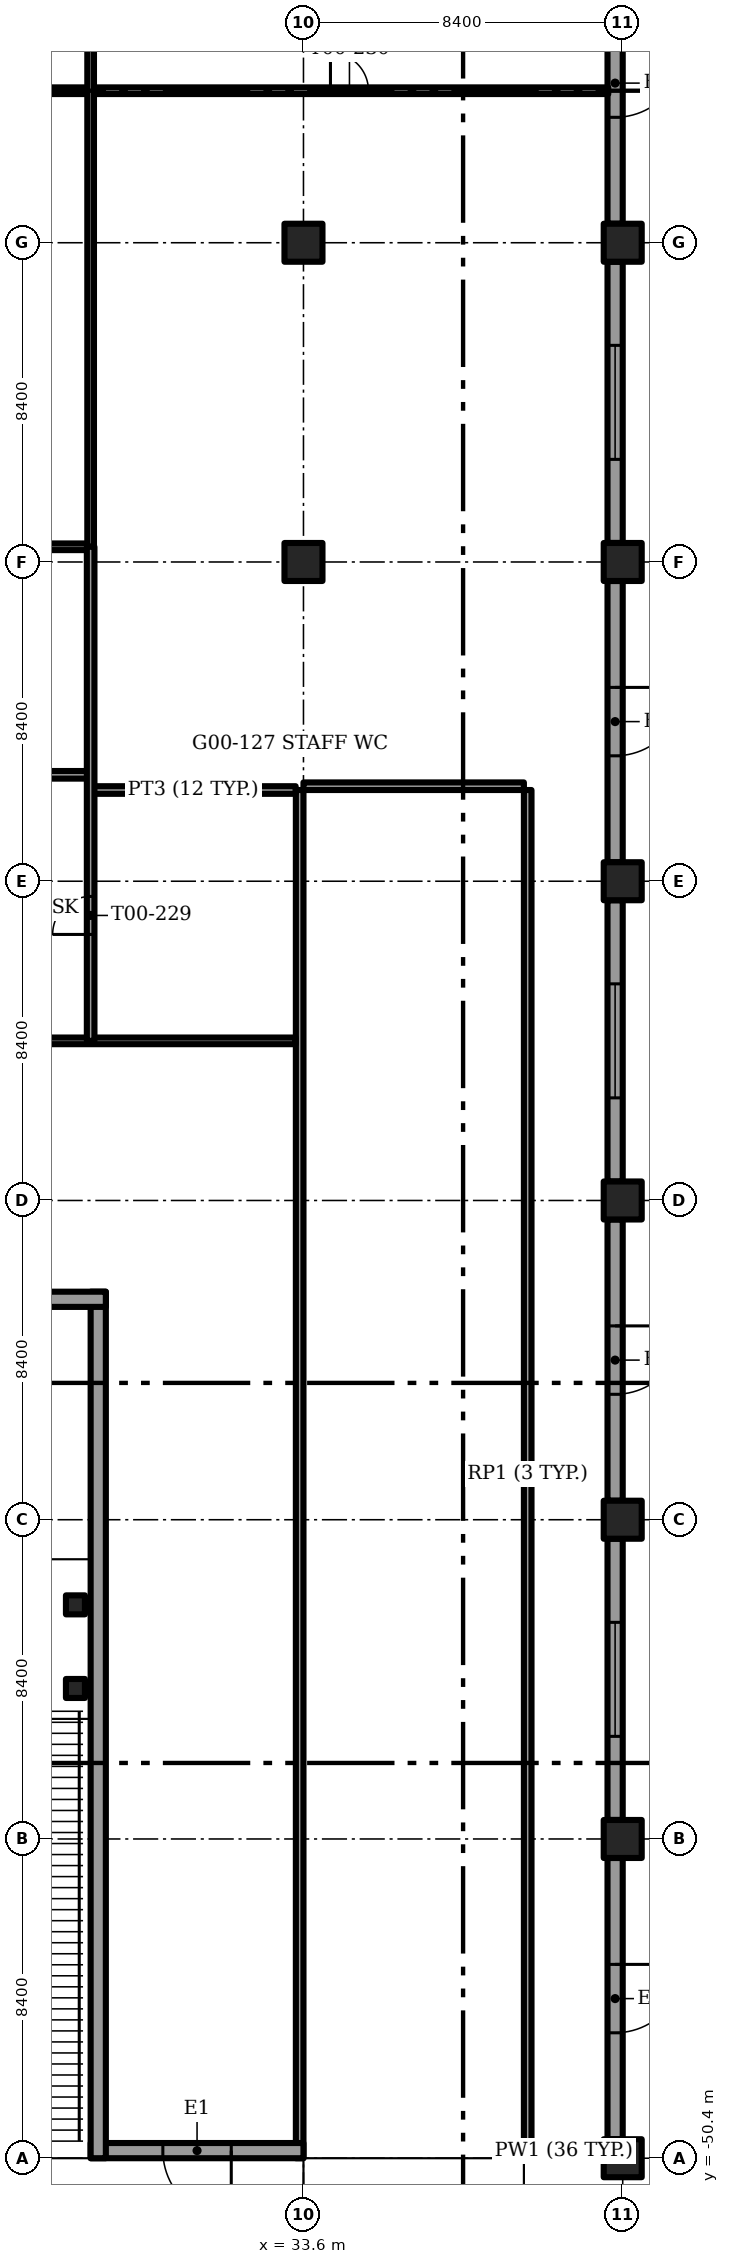
"""IFC4 building model, lengths in metres.
Left out: names, types, materials, properties, quantities, classifications, styles, units other than length and angle.
Written with IfcOpenShell. Run it as: python <this file> out.ifc"""

import sys

from ifc_helpers import new_model, si_unit, direction, frame, frame_2d, origin, origin_2d, place, context, subcontext, project, spatial, rectangle, extrude, element, fill, save


model = new_model("IFC4")
c1 = context("Model", 3, precision=1e-05, world=origin(), true_north=direction((0.0, 1.0)))
c2 = subcontext(c1, "Body", "Model", "MODEL_VIEW")
j1 = project(units=[si_unit("LENGTHUNIT", "METRE"), si_unit("PLANEANGLEUNIT", "RADIAN")], contexts=[c1])
p1 = place(None, origin())
s1 = spatial("IfcSite", under=j1, at=p1, CompositionType="ELEMENT")
p2 = place(p1, origin())
s2 = spatial("IfcBuilding", under=s1, at=p2, CompositionType="ELEMENT")
p3 = place(p2, origin())
s3 = spatial("IfcBuildingStorey", under=s2, at=p3, CompositionType="ELEMENT", Elevation=0.0)
for number, where, z_axis, x_axis in (
    (1, (33.6, -8.4, -0.35), (0.0, 0.0, 1.0), (1.0, 0.0, 0.0)),
    (2, (33.6, 0.0, -0.35), (0.0, 0.0, 1.0), (1.0, 0.0, 0.0)),
    (3, (42.0, -50.4, -0.35), (0.0, 0.0, 1.0), (1.0, 0.0, 0.0)),
    (4, (42.0, -42.0, -0.35), (0.0, 0.0, 1.0), (1.0, 0.0, 0.0)),
    (5, (42.0, -33.6, -0.35), (0.0, 0.0, 1.0), (1.0, 0.0, 0.0)),
    (6, (42.0, -25.2, -0.35), (0.0, 0.0, 1.0), (1.0, 0.0, 0.0)),
    (7, (42.0, -16.8, -0.35), (0.0, 0.0, 1.0), (1.0, 0.0, 0.0)),
    (8, (42.0, -8.4, -0.35), (0.0, 0.0, 1.0), (1.0, 0.0, 0.0)),
    (9, (42.0, 0.0, -0.35), (0.0, 0.0, 1.0), (1.0, 0.0, 0.0)),
):
    element("IfcColumn", number, at=place(p3, frame(where, z_axis=z_axis, x_axis=x_axis)), inside=s3, PredefinedType="COLUMN", context=c2, shape_type="SweptSolid", body=[
        extrude(rectangle(XDim=1.0, YDim=1.0, at=origin_2d()), origin(), (0.0, 0.0, 1.0), 6.0),
    ])
p4 = place(p3, frame((41.5, -50.2, 0.0), z_axis=(0.0, 0.0, 1.0), x_axis=(-1.0, 0.0, 0.0)))
e10 = element("IfcWall", 10, at=p4, inside=s3, PredefinedType="SOLIDWALL", context=c2, shape_type="SweptSolid", body=[
    extrude(rectangle(XDim=2.1, YDim=0.4, at=frame_2d((1.05, 0.0))), origin(), (0.0, 0.0, 1.0), 5.65),
])
p5 = place(p3, frame((33.6, -50.2, 0.0), z_axis=(0.0, 0.0, 1.0), x_axis=(-1.0, 0.0, 0.0)))
e11 = element("IfcWall", 11, at=p5, inside=s3, PredefinedType="SOLIDWALL", context=c2, shape_type="SweptSolid", body=[
    extrude(rectangle(XDim=5.6, YDim=0.4, at=frame_2d((2.8, 0.0))), origin(), (0.0, 0.0, 1.0), 5.65),
])
p6 = place(p5, frame((1.9, 0.0, 0.0)))
e12 = element("IfcOpeningElement", 12, at=p6, cuts=e11, PredefinedType="OPENING", context=c2, shape_type="SweptSolid", body=[
    extrude(rectangle(XDim=1.8, YDim=2.4, at=frame_2d((0.9, 1.2))), frame((0.0, 0.2, 0.0), z_axis=(0.0, -1.0, 0.0), x_axis=(1.0, 0.0, 0.0)), (0.0, 0.0, 1.0), 0.4),
])
p7 = place(p3, frame((41.8, 7.9, 0.0), z_axis=(0.0, 0.0, 1.0), x_axis=(0.0, -1.0, 0.0)))
e13 = element("IfcWall", 13, at=p7, inside=s3, PredefinedType="SOLIDWALL", context=c2, shape_type="SweptSolid", body=[
    extrude(rectangle(XDim=7.4, YDim=0.4, at=frame_2d((3.7, 0.0))), origin(), (0.0, 0.0, 1.0), 5.65),
])
p8 = place(p7, frame((2.8, 0.0, 0.0)))
e14 = element("IfcOpeningElement", 14, at=p8, cuts=e13, PredefinedType="OPENING", context=c2, shape_type="SweptSolid", body=[
    extrude(rectangle(XDim=1.8, YDim=2.4, at=frame_2d((0.9, 1.2))), frame((0.0, 0.2, 0.0), z_axis=(0.0, -1.0, 0.0), x_axis=(1.0, 0.0, 0.0)), (0.0, 0.0, 1.0), 0.4),
])
p9 = place(p3, frame((41.8, -0.5, 0.0), z_axis=(0.0, 0.0, 1.0), x_axis=(0.0, -1.0, 0.0)))
e15 = element("IfcWall", 15, at=p9, inside=s3, PredefinedType="SOLIDWALL", context=c2, shape_type="SweptSolid", body=[
    extrude(rectangle(XDim=7.4, YDim=0.4, at=frame_2d((3.7, 0.0))), origin(), (0.0, 0.0, 1.0), 5.65),
])
p10 = place(p9, frame((2.2, 0.0, 1.0)))
e16 = element("IfcOpeningElement", 16, at=p10, cuts=e15, PredefinedType="OPENING", context=c2, shape_type="SweptSolid", body=[
    extrude(rectangle(XDim=3.0, YDim=2.2, at=frame_2d((1.5, 1.1))), frame((0.0, 0.2, 0.0), z_axis=(0.0, -1.0, 0.0), x_axis=(1.0, 0.0, 0.0)), (0.0, 0.0, 1.0), 0.4),
])
p11 = place(p3, frame((41.8, -8.9, 0.0), z_axis=(0.0, 0.0, 1.0), x_axis=(0.0, -1.0, 0.0)))
e17 = element("IfcWall", 17, at=p11, inside=s3, PredefinedType="SOLIDWALL", context=c2, shape_type="SweptSolid", body=[
    extrude(rectangle(XDim=7.4, YDim=0.4, at=frame_2d((3.7, 0.0))), origin(), (0.0, 0.0, 1.0), 5.65),
])
p12 = place(p11, frame((2.8, 0.0, 0.0)))
e18 = element("IfcOpeningElement", 18, at=p12, cuts=e17, PredefinedType="OPENING", context=c2, shape_type="SweptSolid", body=[
    extrude(rectangle(XDim=1.8, YDim=2.4, at=frame_2d((0.9, 1.2))), frame((0.0, 0.2, 0.0), z_axis=(0.0, -1.0, 0.0), x_axis=(1.0, 0.0, 0.0)), (0.0, 0.0, 1.0), 0.4),
])
p13 = place(p3, frame((41.8, -17.3, 0.0), z_axis=(0.0, 0.0, 1.0), x_axis=(0.0, -1.0, 0.0)))
e19 = element("IfcWall", 19, at=p13, inside=s3, PredefinedType="SOLIDWALL", context=c2, shape_type="SweptSolid", body=[
    extrude(rectangle(XDim=7.4, YDim=0.4, at=frame_2d((3.7, 0.0))), origin(), (0.0, 0.0, 1.0), 5.65),
])
p14 = place(p13, frame((2.2, 0.0, 1.0)))
e20 = element("IfcOpeningElement", 20, at=p14, cuts=e19, PredefinedType="OPENING", context=c2, shape_type="SweptSolid", body=[
    extrude(rectangle(XDim=3.0, YDim=2.2, at=frame_2d((1.5, 1.1))), frame((0.0, 0.2, 0.0), z_axis=(0.0, -1.0, 0.0), x_axis=(1.0, 0.0, 0.0)), (0.0, 0.0, 1.0), 0.4),
])
p15 = place(p3, frame((41.8, -25.7, 0.0), z_axis=(0.0, 0.0, 1.0), x_axis=(0.0, -1.0, 0.0)))
e21 = element("IfcWall", 21, at=p15, inside=s3, PredefinedType="SOLIDWALL", context=c2, shape_type="SweptSolid", body=[
    extrude(rectangle(XDim=7.4, YDim=0.4, at=frame_2d((3.7, 0.0))), origin(), (0.0, 0.0, 1.0), 5.65),
])
p16 = place(p15, frame((2.8, 0.0, 0.0)))
e22 = element("IfcOpeningElement", 22, at=p16, cuts=e21, PredefinedType="OPENING", context=c2, shape_type="SweptSolid", body=[
    extrude(rectangle(XDim=1.8, YDim=2.4, at=frame_2d((0.9, 1.2))), frame((0.0, 0.2, 0.0), z_axis=(0.0, -1.0, 0.0), x_axis=(1.0, 0.0, 0.0)), (0.0, 0.0, 1.0), 0.4),
])
p17 = place(p3, frame((41.8, -34.1, 0.0), z_axis=(0.0, 0.0, 1.0), x_axis=(0.0, -1.0, 0.0)))
e23 = element("IfcWall", 23, at=p17, inside=s3, PredefinedType="SOLIDWALL", context=c2, shape_type="SweptSolid", body=[
    extrude(rectangle(XDim=7.4, YDim=0.4, at=frame_2d((3.7, 0.0))), origin(), (0.0, 0.0, 1.0), 5.65),
])
p18 = place(p17, frame((2.2, 0.0, 1.0)))
e24 = element("IfcOpeningElement", 24, at=p18, cuts=e23, PredefinedType="OPENING", context=c2, shape_type="SweptSolid", body=[
    extrude(rectangle(XDim=3.0, YDim=2.2, at=frame_2d((1.5, 1.1))), frame((0.0, 0.2, 0.0), z_axis=(0.0, -1.0, 0.0), x_axis=(1.0, 0.0, 0.0)), (0.0, 0.0, 1.0), 0.4),
])
p19 = place(p3, frame((41.8, -42.5, 0.0), z_axis=(0.0, 0.0, 1.0), x_axis=(0.0, -1.0, 0.0)))
e25 = element("IfcWall", 25, at=p19, inside=s3, PredefinedType="SOLIDWALL", context=c2, shape_type="SweptSolid", body=[
    extrude(rectangle(XDim=7.4, YDim=0.4, at=frame_2d((3.7, 0.0))), origin(), (0.0, 0.0, 1.0), 5.65),
])
p20 = place(p19, frame((2.8, 0.0, 0.0)))
e26 = element("IfcOpeningElement", 26, at=p20, cuts=e25, PredefinedType="OPENING", context=c2, shape_type="SweptSolid", body=[
    extrude(rectangle(XDim=1.8, YDim=2.4, at=frame_2d((0.9, 1.2))), frame((0.0, 0.2, 0.0), z_axis=(0.0, -1.0, 0.0), x_axis=(1.0, 0.0, 0.0)), (0.0, 0.0, 1.0), 0.4),
])
p21 = place(p3, frame((28.2, -50.4, 0.0), z_axis=(0.0, 0.0, 1.0), x_axis=(0.0, 1.0, 0.0)))
e27 = element("IfcWall", 27, at=p21, inside=s3, PredefinedType="SOLIDWALL", context=c2, shape_type="SweptSolid", body=[
    extrude(rectangle(XDim=22.8, YDim=0.4, at=frame_2d((11.4, 0.0))), origin(), (0.0, 0.0, 1.0), 5.65),
])
p22 = place(p3, frame((13.6, -27.8, 0.0), z_axis=(0.0, 0.0, 1.0), x_axis=(1.0, 0.0, 0.0)))
e28 = element("IfcWall", 28, at=p22, inside=s3, PredefinedType="SOLIDWALL", context=c2, shape_type="SweptSolid", body=[
    extrude(rectangle(XDim=14.8, YDim=0.4, at=frame_2d((7.4, 0.0))), origin(), (0.0, 0.0, 1.0), 5.65),
])
p23 = place(p3, frame((39.5, -50.4, 0.0), z_axis=(0.0, 0.0, 1.0), x_axis=(0.0, 1.0, 0.0)))
e29 = element("IfcWall", 29, at=p23, inside=s3, PredefinedType="PARAPET", context=c2, shape_type="SweptSolid", body=[
    extrude(rectangle(XDim=36.0, YDim=0.2, at=frame_2d((18.0, 0.0))), origin(), (0.0, 0.0, 1.0), 1.1),
])
p24 = place(p3, frame((39.4, -14.3, 0.0), z_axis=(0.0, 0.0, 1.0), x_axis=(-1.0, 0.0, 0.0)))
e30 = element("IfcWall", 30, at=p24, inside=s3, PredefinedType="PARAPET", context=c2, shape_type="SweptSolid", body=[
    extrude(rectangle(XDim=5.8, YDim=0.2, at=frame_2d((2.9, 0.0))), origin(), (0.0, 0.0, 1.0), 1.1),
])
p25 = place(p3, frame((33.5, -14.4, 0.0), z_axis=(0.0, 0.0, 1.0), x_axis=(0.0, -1.0, 0.0)))
e31 = element("IfcWall", 31, at=p25, inside=s3, PredefinedType="PARAPET", context=c2, shape_type="SweptSolid", body=[
    extrude(rectangle(XDim=36.0, YDim=0.2, at=frame_2d((18.0, 0.0))), origin(), (0.0, 0.0, 1.0), 1.1),
])
for number, where, z_axis, x_axis in (
    (32, (27.6, -38.04, 0.0), (0.0, 0.0, 1.0), (1.0, 0.0, 0.0)),
    (33, (27.6, -35.84, 0.0), (0.0, 0.0, 1.0), (1.0, 0.0, 0.0)),
):
    element("IfcColumn", number, at=place(p3, frame(where, z_axis=z_axis, x_axis=x_axis)), inside=s3, PredefinedType="COLUMN", context=c2, shape_type="SweptSolid", body=[
        extrude(rectangle(XDim=0.5, YDim=0.5, at=origin_2d()), origin(), (0.0, 0.0, 1.0), 5.65),
    ])
p26 = place(p3, frame((17.0, -21.0, 0.0), z_axis=(0.0, 0.0, 1.0), x_axis=(1.0, 0.0, 0.0)))
e34 = element("IfcWall", 34, at=p26, inside=s3, PredefinedType="PARTITIONING", context=c2, shape_type="SweptSolid", body=[
    extrude(rectangle(XDim=16.395, YDim=0.175, at=frame_2d((8.198, 0.0))), origin(), (0.0, 0.0, 1.0), 5.65),
])
p27 = place(p26, frame((5.0, 0.0, 0.0)))
e35 = element("IfcOpeningElement", 35, at=p27, cuts=e34, PredefinedType="OPENING", context=c2, shape_type="SweptSolid", body=[
    extrude(rectangle(XDim=1.0, YDim=2.1, at=frame_2d((0.5, 1.05))), frame((0.0, 0.087, 0.0), z_axis=(0.0, -1.0, 0.0), x_axis=(1.0, 0.0, 0.0)), (0.0, 0.0, 1.0), 0.175),
])
p28 = place(p3, frame((21.0, -8.0, 0.0), z_axis=(0.0, 0.0, 1.0), x_axis=(1.0, 0.0, 0.0)))
e36 = element("IfcWall", 36, at=p28, inside=s3, PredefinedType="PARTITIONING", context=c2, shape_type="SweptSolid", body=[
    extrude(rectangle(XDim=7.0, YDim=0.175, at=frame_2d((3.5, 0.0))), origin(), (0.0, 0.0, 1.0), 5.65),
])
p29 = place(p28, frame((3.499, 0.0, 0.0)))
e37 = element("IfcOpeningElement", 37, at=p29, cuts=e36, PredefinedType="OPENING", context=c2, shape_type="SweptSolid", body=[
    extrude(rectangle(XDim=1.0, YDim=2.1, at=frame_2d((0.5, 1.05))), frame((0.0, 0.087, 0.0), z_axis=(0.0, -1.0, 0.0), x_axis=(1.0, 0.0, 0.0)), (0.0, 0.0, 1.0), 0.175),
])
p30 = place(p3, frame((17.0, 4.0, 0.0), z_axis=(0.0, 0.0, 1.0), x_axis=(1.0, 0.0, 0.0)))
e38 = element("IfcWall", 38, at=p30, inside=s3, PredefinedType="PARTITIONING", context=c2, shape_type="SweptSolid", body=[
    extrude(rectangle(XDim=24.62, YDim=0.175, at=frame_2d((12.31, 0.0))), origin(), (0.0, 0.0, 1.0), 4.8),
])
p31 = place(p30, frame((5.0, 0.0, 0.0)))
e39 = element("IfcOpeningElement", 39, at=p31, cuts=e38, PredefinedType="OPENING", context=c2, shape_type="SweptSolid", body=[
    extrude(rectangle(XDim=1.0, YDim=2.1, at=frame_2d((0.5, 1.05))), frame((0.0, 0.087, 0.0), z_axis=(0.0, -1.0, 0.0), x_axis=(1.0, 0.0, 0.0)), (0.0, 0.0, 1.0), 0.175),
])
p32 = place(p30, frame((17.31, 0.0, 0.0)))
e40 = element("IfcOpeningElement", 40, at=p32, cuts=e38, PredefinedType="OPENING", context=c2, shape_type="SweptSolid", body=[
    extrude(rectangle(XDim=1.0, YDim=2.1, at=frame_2d((0.5, 1.05))), frame((0.0, 0.087, 0.0), z_axis=(0.0, -1.0, 0.0), x_axis=(1.0, 0.0, 0.0)), (0.0, 0.0, 1.0), 0.175),
])
p33 = place(p3, frame((28.0, -8.0, 0.0), z_axis=(0.0, 0.0, 1.0), x_axis=(0.0, 1.0, 0.0)))
e41 = element("IfcWall", 41, at=p33, inside=s3, PredefinedType="PARTITIONING", context=c2, shape_type="SweptSolid", body=[
    extrude(rectangle(XDim=24.8, YDim=0.175, at=frame_2d((12.4, 0.0))), origin(), (0.0, 0.0, 1.0), 5.65),
])
p34 = place(p33, frame((21.95, 0.0, 0.0)))
e42 = element("IfcOpeningElement", 42, at=p34, cuts=e41, PredefinedType="OPENING", context=c2, shape_type="SweptSolid", body=[
    extrude(rectangle(XDim=0.9, YDim=2.1, at=frame_2d((0.45, 1.05))), frame((0.0, 0.087, 0.0), z_axis=(0.0, -1.0, 0.0), x_axis=(1.0, 0.0, 0.0)), (0.0, 0.0, 1.0), 0.175),
])
p35 = place(p33, frame((18.5, 0.0, 0.0)))
e43 = element("IfcOpeningElement", 43, at=p35, cuts=e41, PredefinedType="OPENING", context=c2, shape_type="SweptSolid", body=[
    extrude(rectangle(XDim=1.0, YDim=2.1, at=frame_2d((0.5, 1.05))), frame((0.0, 0.087, 0.0), z_axis=(0.0, -1.0, 0.0), x_axis=(1.0, 0.0, 0.0)), (0.0, 0.0, 1.0), 0.175),
])
p36 = place(p3, frame((28.0, -14.4, 0.0), z_axis=(0.0, 0.0, 1.0), x_axis=(1.0, 0.0, 0.0)))
e44 = element("IfcWall", 44, at=p36, inside=s3, PredefinedType="PARTITIONING", context=c2, shape_type="SweptSolid", body=[
    extrude(rectangle(XDim=5.395, YDim=0.2, at=frame_2d((2.698, 0.0))), origin(), (0.0, 0.0, 1.0), 5.65),
])
p37 = place(p3, frame((21.0, -14.0, 0.0), z_axis=(0.0, 0.0, 1.0), x_axis=(1.0, 0.0, 0.0)))
e45 = element("IfcWall", 45, at=p37, inside=s3, PredefinedType="PARTITIONING", context=c2, shape_type="SweptSolid", body=[
    extrude(rectangle(XDim=7.0, YDim=0.2, at=frame_2d((3.5, 0.0))), origin(), (0.0, 0.0, 1.0), 5.65),
])
p38 = place(p3, frame((28.0, -21.0, 0.0), z_axis=(0.0, 0.0, 1.0), x_axis=(0.0, 1.0, 0.0)))
e46 = element("IfcWall", 46, at=p38, inside=s3, PredefinedType="PARTITIONING", context=c2, shape_type="SweptSolid", body=[
    extrude(rectangle(XDim=13.0, YDim=0.2, at=frame_2d((6.5, 0.0))), origin(), (0.0, 0.0, 1.0), 5.65),
])
p39 = place(p38, frame((2.8, 0.0, 0.0)))
e47 = element("IfcOpeningElement", 47, at=p39, cuts=e46, PredefinedType="OPENING", context=c2, shape_type="SweptSolid", body=[
    extrude(rectangle(XDim=1.0, YDim=2.1, at=frame_2d((0.5, 1.05))), frame((0.0, 0.1, 0.0), z_axis=(0.0, -1.0, 0.0), x_axis=(1.0, 0.0, 0.0)), (0.0, 0.0, 1.0), 0.2),
])
p40 = place(p6, origin())
e48 = element("IfcDoor", 48, at=p40, inside=s3, OperationType="SINGLE_SWING_LEFT", PredefinedType="DOOR", context=c2, shape_type="SweptSolid", body=[
    extrude(rectangle(XDim=1.8, YDim=2.4, at=frame_2d((0.9, 1.2))), frame((0.0, 0.025, 0.0), z_axis=(0.0, -1.0, 0.0), x_axis=(1.0, 0.0, 0.0)), (0.0, 0.0, 1.0), 0.05),
])
fill(e12, e48)
p41 = place(p8, origin())
e49 = element("IfcDoor", 49, at=p41, inside=s3, OperationType="SINGLE_SWING_LEFT", PredefinedType="DOOR", context=c2, shape_type="SweptSolid", body=[
    extrude(rectangle(XDim=1.8, YDim=2.4, at=frame_2d((0.9, 1.2))), frame((0.0, 0.025, 0.0), z_axis=(0.0, -1.0, 0.0), x_axis=(1.0, 0.0, 0.0)), (0.0, 0.0, 1.0), 0.05),
])
fill(e14, e49)
p42 = place(p10, origin())
e50 = element("IfcWindow", 50, at=p42, inside=s3, PartitioningType="SINGLE_PANEL", PredefinedType="WINDOW", context=c2, shape_type="SweptSolid", body=[
    extrude(rectangle(XDim=3.0, YDim=2.2, at=frame_2d((1.5, 1.1))), frame((0.0, 0.03, 0.0), z_axis=(0.0, -1.0, 0.0), x_axis=(1.0, 0.0, 0.0)), (0.0, 0.0, 1.0), 0.06),
])
fill(e16, e50)
p43 = place(p12, origin())
e51 = element("IfcDoor", 51, at=p43, inside=s3, OperationType="SINGLE_SWING_LEFT", PredefinedType="DOOR", context=c2, shape_type="SweptSolid", body=[
    extrude(rectangle(XDim=1.8, YDim=2.4, at=frame_2d((0.9, 1.2))), frame((0.0, 0.025, 0.0), z_axis=(0.0, -1.0, 0.0), x_axis=(1.0, 0.0, 0.0)), (0.0, 0.0, 1.0), 0.05),
])
fill(e18, e51)
p44 = place(p14, origin())
e52 = element("IfcWindow", 52, at=p44, inside=s3, PartitioningType="SINGLE_PANEL", PredefinedType="WINDOW", context=c2, shape_type="SweptSolid", body=[
    extrude(rectangle(XDim=3.0, YDim=2.2, at=frame_2d((1.5, 1.1))), frame((0.0, 0.03, 0.0), z_axis=(0.0, -1.0, 0.0), x_axis=(1.0, 0.0, 0.0)), (0.0, 0.0, 1.0), 0.06),
])
fill(e20, e52)
p45 = place(p16, origin())
e53 = element("IfcDoor", 53, at=p45, inside=s3, OperationType="SINGLE_SWING_LEFT", PredefinedType="DOOR", context=c2, shape_type="SweptSolid", body=[
    extrude(rectangle(XDim=1.8, YDim=2.4, at=frame_2d((0.9, 1.2))), frame((0.0, 0.025, 0.0), z_axis=(0.0, -1.0, 0.0), x_axis=(1.0, 0.0, 0.0)), (0.0, 0.0, 1.0), 0.05),
])
fill(e22, e53)
p46 = place(p18, origin())
e54 = element("IfcWindow", 54, at=p46, inside=s3, PartitioningType="SINGLE_PANEL", PredefinedType="WINDOW", context=c2, shape_type="SweptSolid", body=[
    extrude(rectangle(XDim=3.0, YDim=2.2, at=frame_2d((1.5, 1.1))), frame((0.0, 0.03, 0.0), z_axis=(0.0, -1.0, 0.0), x_axis=(1.0, 0.0, 0.0)), (0.0, 0.0, 1.0), 0.06),
])
fill(e24, e54)
p47 = place(p20, origin())
e55 = element("IfcDoor", 55, at=p47, inside=s3, OperationType="SINGLE_SWING_LEFT", PredefinedType="DOOR", context=c2, shape_type="SweptSolid", body=[
    extrude(rectangle(XDim=1.8, YDim=2.4, at=frame_2d((0.9, 1.2))), frame((0.0, 0.025, 0.0), z_axis=(0.0, -1.0, 0.0), x_axis=(1.0, 0.0, 0.0)), (0.0, 0.0, 1.0), 0.05),
])
fill(e26, e55)
p48 = place(p39, origin())
e56 = element("IfcDoor", 56, at=p48, inside=s3, OperationType="SINGLE_SWING_LEFT", PredefinedType="DOOR", context=c2, shape_type="SweptSolid", body=[
    extrude(rectangle(XDim=1.0, YDim=2.1, at=frame_2d((0.5, 1.05))), frame((0.0, 0.025, 0.0), z_axis=(0.0, -1.0, 0.0), x_axis=(1.0, 0.0, 0.0)), (0.0, 0.0, 1.0), 0.05),
])
fill(e47, e56)
p49 = place(p32, origin())
e57 = element("IfcDoor", 57, at=p49, inside=s3, OperationType="SINGLE_SWING_RIGHT", PredefinedType="DOOR", context=c2, shape_type="SweptSolid", body=[
    extrude(rectangle(XDim=1.0, YDim=2.1, at=frame_2d((0.5, 1.05))), frame((0.0, 0.025, 0.0), z_axis=(0.0, -1.0, 0.0), x_axis=(1.0, 0.0, 0.0)), (0.0, 0.0, 1.0), 0.05),
])
fill(e40, e57)
save(model, sys.argv[1])
